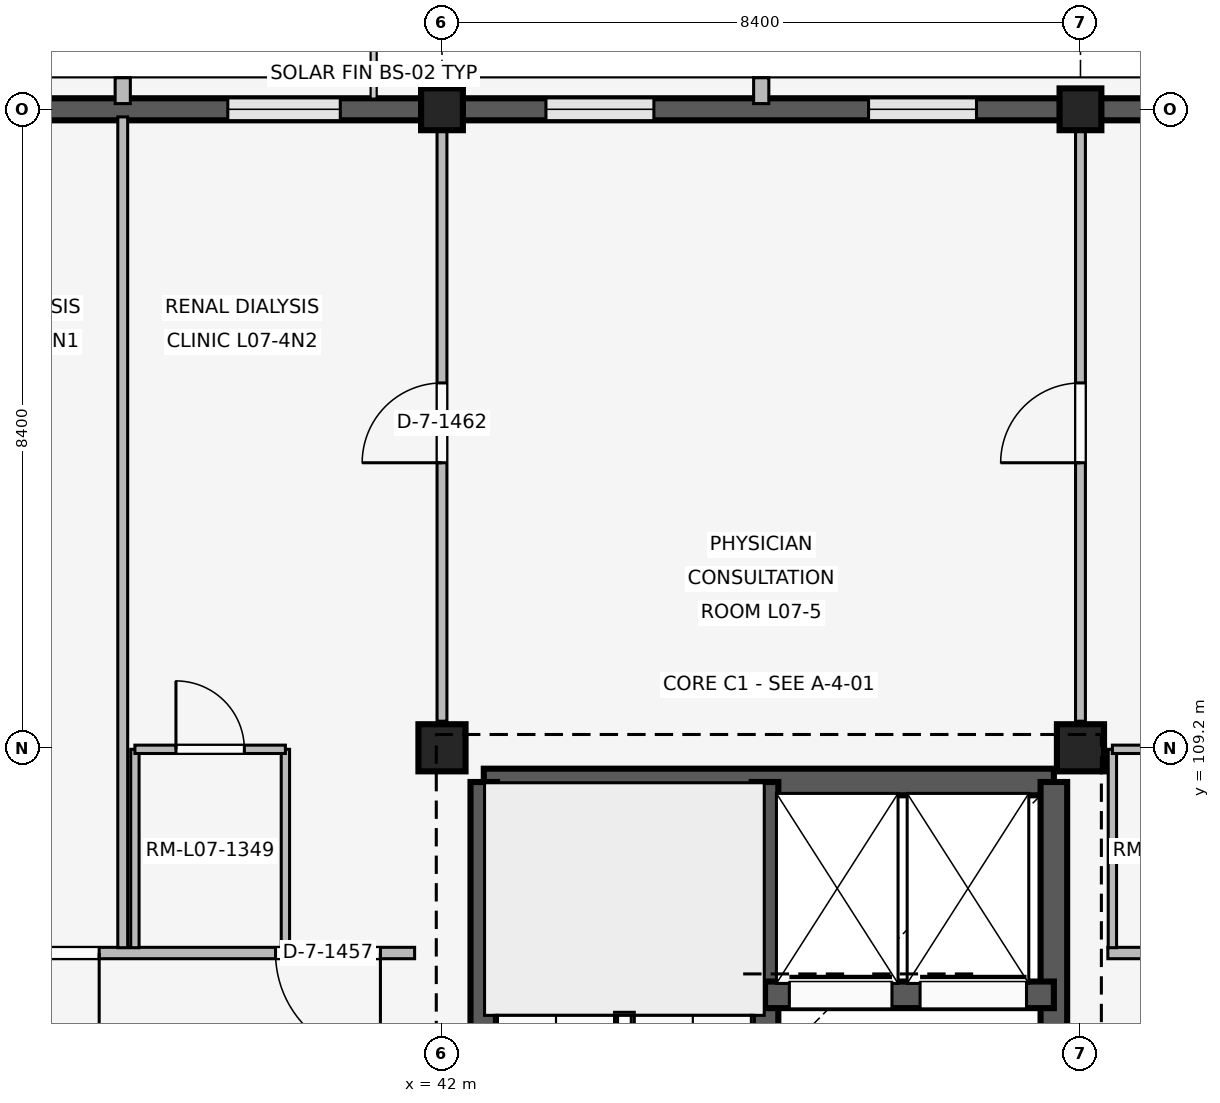
"""IFC4 building model, lengths in metres.
Left out: names, types, materials, properties, quantities, classifications, styles, units other than length and angle.
Written with IfcOpenShell. Run it as: python <this file> out.ifc"""

import sys

from ifc_helpers import new_model, si_unit, direction, frame, frame_2d, origin, origin_2d, place, context, subcontext, project, spatial, rectangle, extrude, element, fill, save


model = new_model("IFC4")
c1 = context("Model", 3, precision=1e-05, world=origin(), true_north=direction((0.0, 1.0)))
c2 = subcontext(c1, "Body", "Model", "MODEL_VIEW")
j1 = project(units=[si_unit("LENGTHUNIT", "METRE"), si_unit("PLANEANGLEUNIT", "RADIAN")], contexts=[c1])
p1 = place(None, origin())
s1 = spatial("IfcSite", under=j1, at=p1, CompositionType="ELEMENT")
p2 = place(p1, origin())
s2 = spatial("IfcBuilding", under=s1, at=p2, CompositionType="ELEMENT")
p3 = place(p2, frame((0.0, 0.0, 28.8)))
s3 = spatial("IfcBuildingStorey", under=s2, at=p3, CompositionType="ELEMENT", Elevation=28.8)
p4 = place(p3, frame((42.0, 109.2, 0.0), z_axis=(0.0, 0.0, 1.0), x_axis=(1.0, 0.0, 0.0)))
e1 = element("IfcColumn", 1, at=p4, inside=s3, PredefinedType="COLUMN", context=c2, shape_type="SweptSolid", body=[
    extrude(rectangle(XDim=0.62, YDim=0.62, at=origin_2d()), origin(), (0.0, 0.0, 1.0), 4.2),
])
p5 = place(p3, frame((42.0, 117.6, 0.0), z_axis=(0.0, 0.0, 1.0), x_axis=(1.0, 0.0, 0.0)))
e2 = element("IfcColumn", 2, at=p5, inside=s3, PredefinedType="COLUMN", context=c2, shape_type="SweptSolid", body=[
    extrude(rectangle(XDim=0.55, YDim=0.55, at=origin_2d()), origin(), (0.0, 0.0, 1.0), 4.2),
])
p6 = place(p3, frame((50.4, 109.2, 0.0), z_axis=(0.0, 0.0, 1.0), x_axis=(1.0, 0.0, 0.0)))
e3 = element("IfcColumn", 3, at=p6, inside=s3, PredefinedType="COLUMN", context=c2, shape_type="SweptSolid", body=[
    extrude(rectangle(XDim=0.62, YDim=0.62, at=origin_2d()), origin(), (0.0, 0.0, 1.0), 4.2),
])
p7 = place(p3, frame((50.4, 117.6, 0.0), z_axis=(0.0, 0.0, 1.0), x_axis=(1.0, 0.0, 0.0)))
e4 = element("IfcColumn", 4, at=p7, inside=s3, PredefinedType="COLUMN", context=c2, shape_type="SweptSolid", body=[
    extrude(rectangle(XDim=0.55, YDim=0.55, at=origin_2d()), origin(), (0.0, 0.0, 1.0), 4.2),
])
p8 = place(p3, frame((33.87, 117.6, 0.0), z_axis=(0.0, 0.0, 1.0), x_axis=(1.0, 0.0, 0.0)))
e5 = element("IfcWall", 5, at=p8, inside=s3, PredefinedType="SOLIDWALL", context=c2, shape_type="SweptSolid", body=[
    extrude(rectangle(XDim=7.86, YDim=0.29, at=frame_2d((3.93, 0.0))), origin(), (0.0, 0.0, 1.0), 3.34),
])
p9 = place(p8, frame((1.068, 0.0, 0.85)))
e6 = element("IfcOpeningElement", 6, at=p9, cuts=e5, PredefinedType="OPENING", context=c2, shape_type="SweptSolid", body=[
    extrude(rectangle(XDim=1.48, YDim=1.6, at=frame_2d((0.74, 0.8))), frame((0.0, 0.155, 0.0), z_axis=(0.0, -1.0, 0.0), x_axis=(1.0, 0.0, 0.0)), (0.0, 0.0, 1.0), 0.31),
])
p10 = place(p8, frame((5.312, 0.0, 0.85)))
e7 = element("IfcOpeningElement", 7, at=p10, cuts=e5, PredefinedType="OPENING", context=c2, shape_type="SweptSolid", body=[
    extrude(rectangle(XDim=1.48, YDim=1.6, at=frame_2d((0.74, 0.8))), frame((0.0, 0.155, 0.0), z_axis=(0.0, -1.0, 0.0), x_axis=(1.0, 0.0, 0.0)), (0.0, 0.0, 1.0), 0.31),
])
p11 = place(p3, frame((37.8, 117.675, 0.0), z_axis=(0.0, 0.0, 1.0), x_axis=(0.0, 1.0, 0.0)))
e8 = element("IfcWall", 8, at=p11, inside=s3, PredefinedType="ELEMENTEDWALL", context=c2, shape_type="SweptSolid", body=[
    extrude(rectangle(XDim=0.34, YDim=0.2, at=frame_2d((0.17, 0.0))), origin(), (0.0, 0.0, 1.0), 3.32),
])
p12 = place(p3, frame((42.27, 117.6, 0.0), z_axis=(0.0, 0.0, 1.0), x_axis=(1.0, 0.0, 0.0)))
e9 = element("IfcWall", 9, at=p12, inside=s3, PredefinedType="SOLIDWALL", context=c2, shape_type="SweptSolid", body=[
    extrude(rectangle(XDim=7.86, YDim=0.29, at=frame_2d((3.93, 0.0))), origin(), (0.0, 0.0, 1.0), 3.34),
])
p13 = place(p12, frame((1.098, 0.0, 0.85)))
e10 = element("IfcOpeningElement", 10, at=p13, cuts=e9, PredefinedType="OPENING", context=c2, shape_type="SweptSolid", body=[
    extrude(rectangle(XDim=1.42, YDim=1.45, at=frame_2d((0.71, 0.725))), frame((0.0, 0.155, 0.0), z_axis=(0.0, -1.0, 0.0), x_axis=(1.0, 0.0, 0.0)), (0.0, 0.0, 1.0), 0.31),
])
p14 = place(p12, frame((5.342, 0.0, 0.85)))
e11 = element("IfcOpeningElement", 11, at=p14, cuts=e9, PredefinedType="OPENING", context=c2, shape_type="SweptSolid", body=[
    extrude(rectangle(XDim=1.42, YDim=1.45, at=frame_2d((0.71, 0.725))), frame((0.0, 0.155, 0.0), z_axis=(0.0, -1.0, 0.0), x_axis=(1.0, 0.0, 0.0)), (0.0, 0.0, 1.0), 0.31),
])
p15 = place(p3, frame((46.2, 117.675, 0.0), z_axis=(0.0, 0.0, 1.0), x_axis=(0.0, 1.0, 0.0)))
e12 = element("IfcWall", 12, at=p15, inside=s3, PredefinedType="ELEMENTEDWALL", context=c2, shape_type="SweptSolid", body=[
    extrude(rectangle(XDim=0.34, YDim=0.2, at=frame_2d((0.17, 0.0))), origin(), (0.0, 0.0, 1.0), 3.32),
])
p16 = place(p3, frame((50.67, 117.6, 0.0), z_axis=(0.0, 0.0, 1.0), x_axis=(1.0, 0.0, 0.0)))
e13 = element("IfcWall", 13, at=p16, inside=s3, PredefinedType="SOLIDWALL", context=c2, shape_type="SweptSolid", body=[
    extrude(rectangle(XDim=7.86, YDim=0.29, at=frame_2d((3.93, 0.0))), origin(), (0.0, 0.0, 1.0), 3.34),
])
p17 = place(p16, frame((0.978, 0.0, 0.85)))
e14 = element("IfcOpeningElement", 14, at=p17, cuts=e13, PredefinedType="OPENING", context=c2, shape_type="SweptSolid", body=[
    extrude(rectangle(XDim=1.66, YDim=1.95, at=frame_2d((0.83, 0.975))), frame((0.0, 0.155, 0.0), z_axis=(0.0, -1.0, 0.0), x_axis=(1.0, 0.0, 0.0)), (0.0, 0.0, 1.0), 0.31),
])
p18 = place(p16, frame((5.222, 0.0, 0.85)))
e15 = element("IfcOpeningElement", 15, at=p18, cuts=e13, PredefinedType="OPENING", context=c2, shape_type="SweptSolid", body=[
    extrude(rectangle(XDim=1.66, YDim=1.95, at=frame_2d((0.83, 0.975))), frame((0.0, 0.155, 0.0), z_axis=(0.0, -1.0, 0.0), x_axis=(1.0, 0.0, 0.0)), (0.0, 0.0, 1.0), 0.31),
])
p19 = place(p3, frame((42.55, 108.75, 0.0), z_axis=(0.0, 0.0, 1.0), x_axis=(1.0, 0.0, 0.0)))
e16 = element("IfcWall", 16, at=p19, inside=s3, PredefinedType="SHEAR", context=c2, shape_type="SweptSolid", body=[
    extrude(rectangle(XDim=7.5, YDim=0.35, at=frame_2d((3.75, 0.0))), origin(), (0.0, 0.0, 1.0), 3.94),
])
p20 = place(p3, frame((42.55, 101.2, 0.0), z_axis=(0.0, 0.0, 1.0), x_axis=(0.0, 1.0, 0.0)))
e17 = element("IfcWall", 17, at=p20, inside=s3, PredefinedType="SHEAR", context=c2, shape_type="SweptSolid", body=[
    extrude(rectangle(XDim=7.55, YDim=0.35, at=frame_2d((3.775, 0.0))), origin(), (0.0, 0.0, 1.0), 3.94),
])
p21 = place(p20, frame((0.28, 0.0, 0.0)))
e18 = element("IfcOpeningElement", 18, at=p21, cuts=e17, PredefinedType="OPENING", context=c2, shape_type="SweptSolid", body=[
    extrude(rectangle(XDim=1.0, YDim=2.15, at=frame_2d((0.5, 1.075))), frame((0.0, 0.185, 0.0), z_axis=(0.0, -1.0, 0.0), x_axis=(1.0, 0.0, 0.0)), (0.0, 0.0, 1.0), 0.37),
])
p22 = place(p3, frame((50.05, 101.2, 0.0), z_axis=(0.0, 0.0, 1.0), x_axis=(0.0, 1.0, 0.0)))
e19 = element("IfcWall", 19, at=p22, inside=s3, PredefinedType="SHEAR", context=c2, shape_type="SweptSolid", body=[
    extrude(rectangle(XDim=7.55, YDim=0.35, at=frame_2d((3.775, 0.0))), origin(), (0.0, 0.0, 1.0), 3.94),
])
p23 = place(p22, frame((2.4, 0.0, 0.0)))
e20 = element("IfcOpeningElement", 20, at=p23, cuts=e19, PredefinedType="OPENING", context=c2, shape_type="SweptSolid", body=[
    extrude(rectangle(XDim=1.2, YDim=2.2, at=frame_2d((0.6, 1.1))), frame((0.0, 0.185, 0.0), z_axis=(0.0, -1.0, 0.0), x_axis=(1.0, 0.0, 0.0)), (0.0, 0.0, 1.0), 0.37),
])
p24 = place(p3, frame((46.25, 101.2, 0.0), z_axis=(0.0, 0.0, 1.0), x_axis=(0.0, 1.0, 0.0)))
e21 = element("IfcWall", 21, at=p24, inside=s3, PredefinedType="SHEAR", context=c2, shape_type="SweptSolid", body=[
    extrude(rectangle(XDim=7.55, YDim=0.35, at=frame_2d((3.775, 0.0))), origin(), (0.0, 0.0, 1.0), 3.94),
])
p25 = place(p24, frame((0.28, 0.0, 0.0)))
e22 = element("IfcOpeningElement", 22, at=p25, cuts=e21, PredefinedType="OPENING", context=c2, shape_type="SweptSolid", body=[
    extrude(rectangle(XDim=1.0, YDim=2.15, at=frame_2d((0.5, 1.075))), frame((0.0, 0.185, 0.0), z_axis=(0.0, -1.0, 0.0), x_axis=(1.0, 0.0, 0.0)), (0.0, 0.0, 1.0), 0.37),
])
p26 = place(p3, frame((46.25, 105.95, 0.0), z_axis=(0.0, 0.0, 1.0), x_axis=(1.0, 0.0, 0.0)))
e23 = element("IfcWall", 23, at=p26, inside=s3, PredefinedType="SHEAR", context=c2, shape_type="SweptSolid", body=[
    extrude(rectangle(XDim=3.8, YDim=0.35, at=frame_2d((1.9, 0.0))), origin(), (0.0, 0.0, 1.0), 3.94),
])
p27 = place(p26, frame((0.32, 0.0, 0.0)))
e24 = element("IfcOpeningElement", 24, at=p27, cuts=e23, PredefinedType="OPENING", context=c2, shape_type="SweptSolid", body=[
    extrude(rectangle(XDim=1.35, YDim=2.25, at=frame_2d((0.675, 1.125))), frame((0.0, 0.185, 0.0), z_axis=(0.0, -1.0, 0.0), x_axis=(1.0, 0.0, 0.0)), (0.0, 0.0, 1.0), 0.37),
])
p28 = place(p26, frame((2.04, 0.0, 0.0)))
e25 = element("IfcOpeningElement", 25, at=p28, cuts=e23, PredefinedType="OPENING", context=c2, shape_type="SweptSolid", body=[
    extrude(rectangle(XDim=1.4, YDim=2.25, at=frame_2d((0.7, 1.125))), frame((0.0, 0.185, 0.0), z_axis=(0.0, -1.0, 0.0), x_axis=(1.0, 0.0, 0.0)), (0.0, 0.0, 1.0), 0.37),
])
p29 = place(p3, frame((41.64, 106.5, 0.0), z_axis=(0.0, 0.0, 1.0), x_axis=(-1.0, 0.0, 0.0)))
e26 = element("IfcWall", 26, at=p29, inside=s3, PredefinedType="PARTITIONING", context=c2, shape_type="SweptSolid", body=[
    extrude(rectangle(XDim=7.9, YDim=0.15, at=frame_2d((3.95, 0.0))), origin(), (0.0, 0.0, 1.0), 3.32),
])
p30 = place(p29, frame((0.45, 0.0, 0.0)))
e27 = element("IfcOpeningElement", 27, at=p30, cuts=e26, PredefinedType="OPENING", context=c2, shape_type="SweptSolid", body=[
    extrude(rectangle(XDim=1.38, YDim=2.25, at=frame_2d((0.69, 1.125))), frame((0.0, 0.085, 0.0), z_axis=(0.0, -1.0, 0.0), x_axis=(1.0, 0.0, 0.0)), (0.0, 0.0, 1.0), 0.17),
])
p31 = place(p29, frame((4.15, 0.0, 0.0)))
e28 = element("IfcOpeningElement", 28, at=p31, cuts=e26, PredefinedType="OPENING", context=c2, shape_type="SweptSolid", body=[
    extrude(rectangle(XDim=1.38, YDim=2.25, at=frame_2d((0.69, 1.125))), frame((0.0, 0.085, 0.0), z_axis=(0.0, -1.0, 0.0), x_axis=(1.0, 0.0, 0.0)), (0.0, 0.0, 1.0), 0.17),
])
p32 = place(p3, frame((37.8, 106.57, 0.0), z_axis=(0.0, 0.0, 1.0), x_axis=(0.0, 1.0, 0.0)))
e29 = element("IfcWall", 29, at=p32, inside=s3, PredefinedType="PARTITIONING", context=c2, shape_type="SweptSolid", body=[
    extrude(rectangle(XDim=10.93, YDim=0.13, at=frame_2d((5.465, 0.0))), origin(), (0.0, 0.0, 1.0), 3.32),
])
for number, where, z_axis, x_axis in (
    (30, (37.96, 106.57, 0.0), (0.0, 0.0, 1.0), (0.0, 1.0, 0.0)),
    (31, (39.94, 106.57, 0.0), (0.0, 0.0, 1.0), (0.0, 1.0, 0.0)),
):
    element("IfcWall", number, at=place(p3, frame(where, z_axis=z_axis, x_axis=x_axis)), inside=s3, PredefinedType="PARTITIONING", context=c2, shape_type="SweptSolid", body=[
        extrude(rectangle(XDim=2.61, YDim=0.11, at=frame_2d((1.305, 0.0))), origin(), (0.0, 0.0, 1.0), 3.32),
    ])
p33 = place(p3, frame((37.96, 109.18, 0.0), z_axis=(0.0, 0.0, 1.0), x_axis=(1.0, 0.0, 0.0)))
e32 = element("IfcWall", 32, at=p33, inside=s3, PredefinedType="PARTITIONING", context=c2, shape_type="SweptSolid", body=[
    extrude(rectangle(XDim=1.98, YDim=0.11, at=frame_2d((0.99, 0.0))), origin(), (0.0, 0.0, 1.0), 3.32),
])
p34 = place(p33, frame((0.54, 0.0, 0.0)))
e33 = element("IfcOpeningElement", 33, at=p34, cuts=e32, PredefinedType="OPENING", context=c2, shape_type="SweptSolid", body=[
    extrude(rectangle(XDim=0.9, YDim=2.1, at=frame_2d((0.45, 1.05))), frame((0.0, 0.065, 0.0), z_axis=(0.0, -1.0, 0.0), x_axis=(1.0, 0.0, 0.0)), (0.0, 0.0, 1.0), 0.13),
])
p35 = place(p3, frame((42.0, 109.55, 0.0), z_axis=(0.0, 0.0, 1.0), x_axis=(0.0, 1.0, 0.0)))
e34 = element("IfcWall", 34, at=p35, inside=s3, PredefinedType="PARTITIONING", context=c2, shape_type="SweptSolid", body=[
    extrude(rectangle(XDim=7.91, YDim=0.13, at=frame_2d((3.955, 0.0))), origin(), (0.0, 0.0, 1.0), 3.32),
])
p36 = place(p35, frame((3.4, 0.0, 0.0)))
e35 = element("IfcOpeningElement", 35, at=p36, cuts=e34, PredefinedType="OPENING", context=c2, shape_type="SweptSolid", body=[
    extrude(rectangle(XDim=1.05, YDim=2.2, at=frame_2d((0.525, 1.1))), frame((0.0, 0.075, 0.0), z_axis=(0.0, -1.0, 0.0), x_axis=(1.0, 0.0, 0.0)), (0.0, 0.0, 1.0), 0.15),
])
p37 = place(p3, frame((50.4, 109.55, 0.0), z_axis=(0.0, 0.0, 1.0), x_axis=(0.0, 1.0, 0.0)))
e36 = element("IfcWall", 36, at=p37, inside=s3, PredefinedType="PARTITIONING", context=c2, shape_type="SweptSolid", body=[
    extrude(rectangle(XDim=7.91, YDim=0.13, at=frame_2d((3.955, 0.0))), origin(), (0.0, 0.0, 1.0), 3.32),
])
p38 = place(p37, frame((3.4, 0.0, 0.0)))
e37 = element("IfcOpeningElement", 37, at=p38, cuts=e36, PredefinedType="OPENING", context=c2, shape_type="SweptSolid", body=[
    extrude(rectangle(XDim=1.05, YDim=2.2, at=frame_2d((0.525, 1.1))), frame((0.0, 0.075, 0.0), z_axis=(0.0, -1.0, 0.0), x_axis=(1.0, 0.0, 0.0)), (0.0, 0.0, 1.0), 0.15),
])
p39 = place(p3, frame((58.72, 106.5, 0.0), z_axis=(0.0, 0.0, 1.0), x_axis=(-1.0, 0.0, 0.0)))
e38 = element("IfcWall", 38, at=p39, inside=s3, PredefinedType="PARTITIONING", context=c2, shape_type="SweptSolid", body=[
    extrude(rectangle(XDim=7.96, YDim=0.15, at=frame_2d((3.98, 0.0))), origin(), (0.0, 0.0, 1.0), 3.32),
])
p40 = place(p39, frame((0.73, 0.0, 0.0)))
e39 = element("IfcOpeningElement", 39, at=p40, cuts=e38, PredefinedType="OPENING", context=c2, shape_type="SweptSolid", body=[
    extrude(rectangle(XDim=1.38, YDim=2.25, at=frame_2d((0.69, 1.125))), frame((0.0, 0.085, 0.0), z_axis=(0.0, -1.0, 0.0), x_axis=(1.0, 0.0, 0.0)), (0.0, 0.0, 1.0), 0.17),
])
p41 = place(p39, frame((4.43, 0.0, 0.0)))
e40 = element("IfcOpeningElement", 40, at=p41, cuts=e38, PredefinedType="OPENING", context=c2, shape_type="SweptSolid", body=[
    extrude(rectangle(XDim=1.38, YDim=2.25, at=frame_2d((0.69, 1.125))), frame((0.0, 0.085, 0.0), z_axis=(0.0, -1.0, 0.0), x_axis=(1.0, 0.0, 0.0)), (0.0, 0.0, 1.0), 0.17),
])
p42 = place(p3, frame((50.82, 106.57, 0.0), z_axis=(0.0, 0.0, 1.0), x_axis=(0.0, 1.0, 0.0)))
e41 = element("IfcWall", 41, at=p42, inside=s3, PredefinedType="PARTITIONING", context=c2, shape_type="SweptSolid", body=[
    extrude(rectangle(XDim=2.61, YDim=0.11, at=frame_2d((1.305, 0.0))), origin(), (0.0, 0.0, 1.0), 3.32),
])
p43 = place(p3, frame((50.82, 109.18, 0.0), z_axis=(0.0, 0.0, 1.0), x_axis=(1.0, 0.0, 0.0)))
e42 = element("IfcWall", 42, at=p43, inside=s3, PredefinedType="PARTITIONING", context=c2, shape_type="SweptSolid", body=[
    extrude(rectangle(XDim=1.98, YDim=0.11, at=frame_2d((0.99, 0.0))), origin(), (0.0, 0.0, 1.0), 3.32),
])
p44 = place(p43, frame((0.54, 0.0, 0.0)))
e43 = element("IfcOpeningElement", 43, at=p44, cuts=e42, PredefinedType="OPENING", context=c2, shape_type="SweptSolid", body=[
    extrude(rectangle(XDim=0.9, YDim=2.1, at=frame_2d((0.45, 1.05))), frame((0.0, 0.065, 0.0), z_axis=(0.0, -1.0, 0.0), x_axis=(1.0, 0.0, 0.0)), (0.0, 0.0, 1.0), 0.13),
])
p45 = place(p10, origin())
e44 = element("IfcWindow", 44, at=p45, inside=s3, PartitioningType="SINGLE_PANEL", PredefinedType="WINDOW", context=c2, shape_type="SweptSolid", body=[
    extrude(rectangle(XDim=1.48, YDim=1.6, at=frame_2d((0.74, 0.8))), frame((0.0, 0.03, 0.0), z_axis=(0.0, -1.0, 0.0), x_axis=(1.0, 0.0, 0.0)), (0.0, 0.0, 1.0), 0.06),
])
fill(e7, e44)
p46 = place(p13, origin())
e45 = element("IfcWindow", 45, at=p46, inside=s3, PartitioningType="SINGLE_PANEL", PredefinedType="WINDOW", context=c2, shape_type="SweptSolid", body=[
    extrude(rectangle(XDim=1.42, YDim=1.45, at=frame_2d((0.71, 0.725))), frame((0.0, 0.03, 0.0), z_axis=(0.0, -1.0, 0.0), x_axis=(1.0, 0.0, 0.0)), (0.0, 0.0, 1.0), 0.06),
])
fill(e10, e45)
p47 = place(p14, origin())
e46 = element("IfcWindow", 46, at=p47, inside=s3, PartitioningType="SINGLE_PANEL", PredefinedType="WINDOW", context=c2, shape_type="SweptSolid", body=[
    extrude(rectangle(XDim=1.42, YDim=1.45, at=frame_2d((0.71, 0.725))), frame((0.0, 0.03, 0.0), z_axis=(0.0, -1.0, 0.0), x_axis=(1.0, 0.0, 0.0)), (0.0, 0.0, 1.0), 0.06),
])
fill(e11, e46)
p48 = place(p27, origin())
e47 = element("IfcDoor", 47, at=p48, inside=s3, OperationType="SLIDING_TO_LEFT", PredefinedType="DOOR", context=c2, shape_type="SweptSolid", body=[
    extrude(rectangle(XDim=1.35, YDim=2.25, at=frame_2d((0.675, 1.125))), frame((0.0, 0.025, 0.0), z_axis=(0.0, -1.0, 0.0), x_axis=(1.0, 0.0, 0.0)), (0.0, 0.0, 1.0), 0.05),
])
fill(e24, e47)
p49 = place(p28, origin())
e48 = element("IfcDoor", 48, at=p49, inside=s3, OperationType="SLIDING_TO_LEFT", PredefinedType="DOOR", context=c2, shape_type="SweptSolid", body=[
    extrude(rectangle(XDim=1.4, YDim=2.25, at=frame_2d((0.7, 1.125))), frame((0.0, 0.025, 0.0), z_axis=(0.0, -1.0, 0.0), x_axis=(1.0, 0.0, 0.0)), (0.0, 0.0, 1.0), 0.05),
])
fill(e25, e48)
p50 = place(p30, origin())
e49 = element("IfcDoor", 49, at=p50, inside=s3, OperationType="SINGLE_SWING_LEFT", PredefinedType="DOOR", context=c2, shape_type="SweptSolid", body=[
    extrude(rectangle(XDim=1.38, YDim=2.25, at=frame_2d((0.69, 1.125))), frame((0.0, 0.025, 0.0), z_axis=(0.0, -1.0, 0.0), x_axis=(1.0, 0.0, 0.0)), (0.0, 0.0, 1.0), 0.05),
])
fill(e27, e49)
p51 = place(p31, origin())
e50 = element("IfcDoor", 50, at=p51, inside=s3, OperationType="SINGLE_SWING_LEFT", PredefinedType="DOOR", context=c2, shape_type="SweptSolid", body=[
    extrude(rectangle(XDim=1.38, YDim=2.25, at=frame_2d((0.69, 1.125))), frame((0.0, 0.025, 0.0), z_axis=(0.0, -1.0, 0.0), x_axis=(1.0, 0.0, 0.0)), (0.0, 0.0, 1.0), 0.05),
])
fill(e28, e50)
p52 = place(p34, origin())
e51 = element("IfcDoor", 51, at=p52, inside=s3, OperationType="SINGLE_SWING_LEFT", PredefinedType="DOOR", context=c2, shape_type="SweptSolid", body=[
    extrude(rectangle(XDim=0.9, YDim=2.1, at=frame_2d((0.45, 1.05))), frame((0.0, 0.025, 0.0), z_axis=(0.0, -1.0, 0.0), x_axis=(1.0, 0.0, 0.0)), (0.0, 0.0, 1.0), 0.05),
])
fill(e33, e51)
p53 = place(p36, origin())
e52 = element("IfcDoor", 52, at=p53, inside=s3, OperationType="SINGLE_SWING_LEFT", PredefinedType="DOOR", context=c2, shape_type="SweptSolid", body=[
    extrude(rectangle(XDim=1.05, YDim=2.2, at=frame_2d((0.525, 1.1))), frame((0.0, 0.025, 0.0), z_axis=(0.0, -1.0, 0.0), x_axis=(1.0, 0.0, 0.0)), (0.0, 0.0, 1.0), 0.05),
])
fill(e35, e52)
p54 = place(p38, origin())
e53 = element("IfcDoor", 53, at=p54, inside=s3, OperationType="SINGLE_SWING_LEFT", PredefinedType="DOOR", context=c2, shape_type="SweptSolid", body=[
    extrude(rectangle(XDim=1.05, YDim=2.2, at=frame_2d((0.525, 1.1))), frame((0.0, 0.025, 0.0), z_axis=(0.0, -1.0, 0.0), x_axis=(1.0, 0.0, 0.0)), (0.0, 0.0, 1.0), 0.05),
])
fill(e37, e53)
save(model, sys.argv[1])
